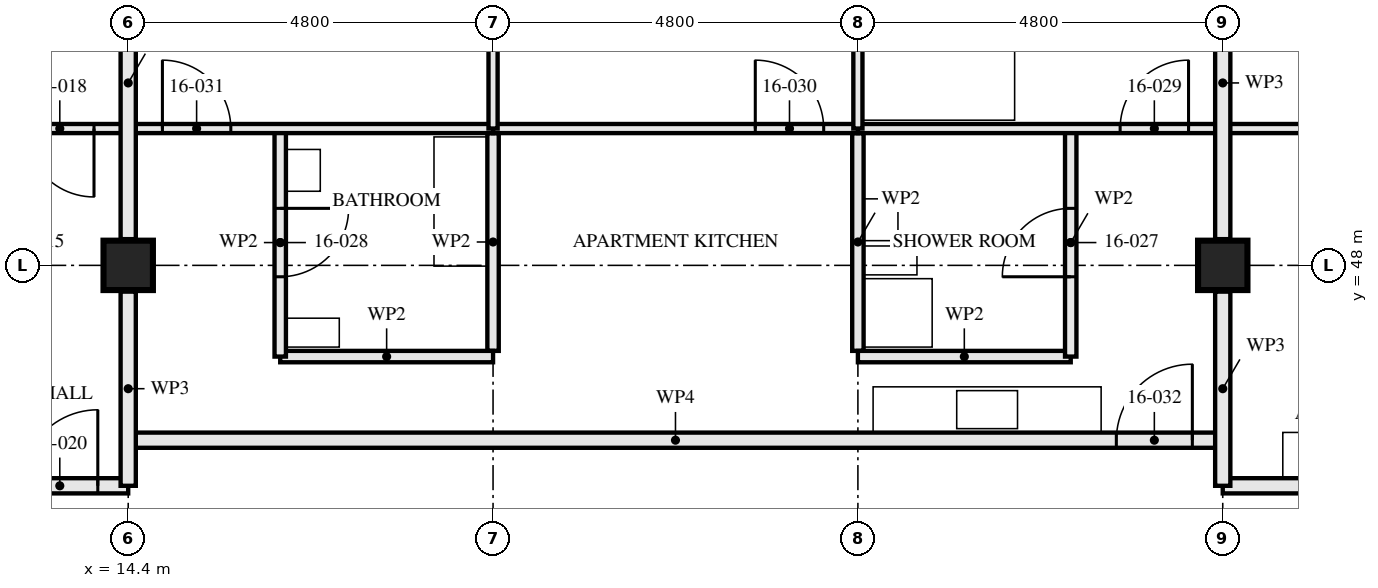
"""IFC4 building model, lengths in metres.
Left out: names, types, materials, properties, quantities, classifications, styles, units other than length and angle.
Written with IfcOpenShell. Run it as: python <this file> out.ifc"""

import sys

from ifc_helpers import new_model, si_unit, direction, frame, frame_2d, origin, origin_2d, place, context, subcontext, project, spatial, rectangle, hollow_rectangle, extrude, element, fill, save


model = new_model("IFC4")
c1 = context("Model", 3, precision=1e-05, world=origin(), true_north=direction((0.0, 1.0)))
c2 = subcontext(c1, "Body", "Model", "MODEL_VIEW")
j1 = project(units=[si_unit("LENGTHUNIT", "METRE"), si_unit("PLANEANGLEUNIT", "RADIAN")], contexts=[c1])
p1 = place(None, origin())
s1 = spatial("IfcSite", under=j1, at=p1, CompositionType="ELEMENT")
p2 = place(p1, origin())
s2 = spatial("IfcBuilding", under=s1, at=p2, CompositionType="ELEMENT")
p3 = place(p2, frame((0.0, 0.0, 62.0)))
s3 = spatial("IfcBuildingStorey", under=s2, at=p3, CompositionType="ELEMENT", Elevation=62.0)
for number, where, z_axis, x_axis in (
    (1, (14.4, 48.0, 0.0), (0.0, 0.0, 1.0), (1.0, 0.0, 0.0)),
    (2, (28.8, 48.0, 0.0), (0.0, 0.0, 1.0), (1.0, 0.0, 0.0)),
):
    element("IfcColumn", number, at=place(p3, frame(where, z_axis=z_axis, x_axis=x_axis)), inside=s3, PredefinedType="COLUMN", context=c2, shape_type="SweptSolid", body=[
        extrude(hollow_rectangle(XDim=0.65, YDim=0.65, WallThickness=0.05, at=origin_2d()), origin(), (0.0, 0.0, 1.0), 3.5),
    ])
p4 = place(p3, frame((14.4, 49.8, 0.0), z_axis=(0.0, 0.0, 1.0), x_axis=(-1.0, 0.0, 0.0)))
e3 = element("IfcWall", 3, at=p4, inside=s3, PredefinedType="PARTITIONING", context=c2, shape_type="SweptSolid", body=[
    extrude(rectangle(XDim=4.8, YDim=0.12, at=frame_2d((2.4, 0.0))), origin(), (0.0, 0.0, 1.0), 3.33),
])
p5 = place(p4, frame((0.45, 0.0, 0.0)))
e4 = element("IfcOpeningElement", 4, at=p5, cuts=e3, PredefinedType="OPENING", context=c2, shape_type="SweptSolid", body=[
    extrude(rectangle(XDim=0.9, YDim=2.1, at=frame_2d((0.45, 1.05))), frame((0.0, 0.071, 0.0), z_axis=(0.0, -1.0, 0.0), x_axis=(1.0, 0.0, 0.0)), (0.0, 0.0, 1.0), 0.141),
])
p6 = place(p3, frame((14.4, 45.1, 0.0), z_axis=(0.0, 0.0, 1.0), x_axis=(-1.0, 0.0, 0.0)))
e5 = element("IfcWall", 5, at=p6, inside=s3, PredefinedType="PARTITIONING", context=c2, shape_type="SweptSolid", body=[
    extrude(rectangle(XDim=9.6, YDim=0.2, at=frame_2d((4.8, 0.0))), origin(), (0.0, 0.0, 1.0), 3.33),
])
p7 = place(p6, frame((0.4, 0.0, 0.0)))
e6 = element("IfcOpeningElement", 6, at=p7, cuts=e5, PredefinedType="OPENING", context=c2, shape_type="SweptSolid", body=[
    extrude(rectangle(XDim=1.0, YDim=2.1, at=frame_2d((0.5, 1.05))), frame((0.0, 0.111, 0.0), z_axis=(0.0, -1.0, 0.0), x_axis=(1.0, 0.0, 0.0)), (0.0, 0.0, 1.0), 0.221),
])
p8 = place(p3, frame((26.8, 49.8, 0.0), z_axis=(0.0, 0.0, 1.0), x_axis=(0.0, -1.0, 0.0)))
e7 = element("IfcWall", 7, at=p8, inside=s3, PredefinedType="PARTITIONING", context=c2, shape_type="SweptSolid", body=[
    extrude(rectangle(XDim=3.0, YDim=0.15, at=frame_2d((1.5, 0.0))), origin(), (0.0, 0.0, 1.0), 2.55),
])
p9 = place(p8, frame((1.05, 0.0, 0.0)))
e8 = element("IfcOpeningElement", 8, at=p9, cuts=e7, PredefinedType="OPENING", context=c2, shape_type="SweptSolid", body=[
    extrude(rectangle(XDim=0.9, YDim=2.1, at=frame_2d((0.45, 1.05))), frame((0.0, 0.085, 0.0), z_axis=(0.0, -1.0, 0.0), x_axis=(1.0, 0.0, 0.0)), (0.0, 0.0, 1.0), 0.171),
])
p10 = place(p3, frame((26.8, 46.8, 0.0), z_axis=(0.0, 0.0, 1.0), x_axis=(-1.0, 0.0, 0.0)))
e9 = element("IfcWall", 9, at=p10, inside=s3, PredefinedType="PARTITIONING", context=c2, shape_type="SweptSolid", body=[
    extrude(rectangle(XDim=2.8, YDim=0.15, at=frame_2d((1.4, 0.0))), origin(), (0.0, 0.0, 1.0), 3.33),
])
p11 = place(p3, frame((16.4, 49.8, 0.0), z_axis=(0.0, 0.0, 1.0), x_axis=(0.0, -1.0, 0.0)))
e10 = element("IfcWall", 10, at=p11, inside=s3, PredefinedType="PARTITIONING", context=c2, shape_type="SweptSolid", body=[
    extrude(rectangle(XDim=3.0, YDim=0.15, at=frame_2d((1.5, 0.0))), origin(), (0.0, 0.0, 1.0), 2.55),
])
p12 = place(p11, frame((1.05, 0.0, 0.0)))
e11 = element("IfcOpeningElement", 11, at=p12, cuts=e10, PredefinedType="OPENING", context=c2, shape_type="SweptSolid", body=[
    extrude(rectangle(XDim=0.9, YDim=2.1, at=frame_2d((0.45, 1.05))), frame((0.0, 0.085, 0.0), z_axis=(0.0, -1.0, 0.0), x_axis=(1.0, 0.0, 0.0)), (0.0, 0.0, 1.0), 0.171),
])
p13 = place(p3, frame((19.2, 46.8, 0.0), z_axis=(0.0, 0.0, 1.0), x_axis=(-1.0, 0.0, 0.0)))
e12 = element("IfcWall", 12, at=p13, inside=s3, PredefinedType="PARTITIONING", context=c2, shape_type="SweptSolid", body=[
    extrude(rectangle(XDim=2.8, YDim=0.15, at=frame_2d((1.4, 0.0))), origin(), (0.0, 0.0, 1.0), 3.33),
])
p14 = place(p3, frame((28.8, 49.8, 0.0), z_axis=(0.0, 0.0, 1.0), x_axis=(-1.0, 0.0, 0.0)))
e13 = element("IfcWall", 13, at=p14, inside=s3, PredefinedType="PARTITIONING", context=c2, shape_type="SweptSolid", body=[
    extrude(rectangle(XDim=4.8, YDim=0.12, at=frame_2d((2.4, 0.0))), origin(), (0.0, 0.0, 1.0), 3.33),
])
p15 = place(p14, frame((0.45, 0.0, 0.0)))
e14 = element("IfcOpeningElement", 14, at=p15, cuts=e13, PredefinedType="OPENING", context=c2, shape_type="SweptSolid", body=[
    extrude(rectangle(XDim=0.9, YDim=2.1, at=frame_2d((0.45, 1.05))), frame((0.0, 0.071, 0.0), z_axis=(0.0, -1.0, 0.0), x_axis=(1.0, 0.0, 0.0)), (0.0, 0.0, 1.0), 0.141),
])
p16 = place(p3, frame((24.0, 49.8, 0.0), z_axis=(0.0, 0.0, 1.0), x_axis=(-1.0, 0.0, 0.0)))
e15 = element("IfcWall", 15, at=p16, inside=s3, PredefinedType="PARTITIONING", context=c2, shape_type="SweptSolid", body=[
    extrude(rectangle(XDim=4.8, YDim=0.12, at=frame_2d((2.4, 0.0))), origin(), (0.0, 0.0, 1.0), 3.33),
])
p17 = place(p16, frame((0.45, 0.0, 0.0)))
e16 = element("IfcOpeningElement", 16, at=p17, cuts=e15, PredefinedType="OPENING", context=c2, shape_type="SweptSolid", body=[
    extrude(rectangle(XDim=0.9, YDim=2.1, at=frame_2d((0.45, 1.05))), frame((0.0, 0.071, 0.0), z_axis=(0.0, -1.0, 0.0), x_axis=(1.0, 0.0, 0.0)), (0.0, 0.0, 1.0), 0.141),
])
p18 = place(p3, frame((19.2, 49.8, 0.0), z_axis=(0.0, 0.0, 1.0), x_axis=(-1.0, 0.0, 0.0)))
e17 = element("IfcWall", 17, at=p18, inside=s3, PredefinedType="PARTITIONING", context=c2, shape_type="SweptSolid", body=[
    extrude(rectangle(XDim=4.8, YDim=0.12, at=frame_2d((2.4, 0.0))), origin(), (0.0, 0.0, 1.0), 3.33),
])
p19 = place(p18, frame((3.45, 0.0, 0.0)))
e18 = element("IfcOpeningElement", 18, at=p19, cuts=e17, PredefinedType="OPENING", context=c2, shape_type="SweptSolid", body=[
    extrude(rectangle(XDim=0.9, YDim=2.1, at=frame_2d((0.45, 1.05))), frame((0.0, 0.071, 0.0), z_axis=(0.0, -1.0, 0.0), x_axis=(1.0, 0.0, 0.0)), (0.0, 0.0, 1.0), 0.141),
])
for number, where, z_axis, x_axis in (
    (19, (24.0, 57.28, 0.0), (0.0, 0.0, 1.0), (0.0, -1.0, 0.0)),
    (20, (19.2, 57.28, 0.0), (0.0, 0.0, 1.0), (0.0, -1.0, 0.0)),
):
    element("IfcWall", number, at=place(p3, frame(where, z_axis=z_axis, x_axis=x_axis)), inside=s3, PredefinedType="PARTITIONING", context=c2, shape_type="SweptSolid", body=[
        extrude(rectangle(XDim=7.48, YDim=0.12, at=frame_2d((3.74, 0.0))), origin(), (0.0, 0.0, 1.0), 2.55),
    ])
p20 = place(p3, frame((28.8, 45.7, 0.0), z_axis=(0.0, 0.0, 1.0), x_axis=(-1.0, 0.0, 0.0)))
e21 = element("IfcWall", 21, at=p20, inside=s3, PredefinedType="PARTITIONING", context=c2, shape_type="SweptSolid", body=[
    extrude(rectangle(XDim=14.4, YDim=0.2, at=frame_2d((7.2, 0.0))), origin(), (0.0, 0.0, 1.0), 3.33),
])
p21 = place(p20, frame((0.4, 0.0, 0.0)))
e22 = element("IfcOpeningElement", 22, at=p21, cuts=e21, PredefinedType="OPENING", context=c2, shape_type="SweptSolid", body=[
    extrude(rectangle(XDim=1.0, YDim=2.1, at=frame_2d((0.5, 1.05))), frame((0.0, 0.111, 0.0), z_axis=(0.0, -1.0, 0.0), x_axis=(1.0, 0.0, 0.0)), (0.0, 0.0, 1.0), 0.221),
])
p22 = place(p3, frame((33.6, 49.8, 0.0), z_axis=(0.0, 0.0, 1.0), x_axis=(-1.0, 0.0, 0.0)))
e23 = element("IfcWall", 23, at=p22, inside=s3, PredefinedType="PARTITIONING", context=c2, shape_type="SweptSolid", body=[
    extrude(rectangle(XDim=4.8, YDim=0.12, at=frame_2d((2.4, 0.0))), origin(), (0.0, 0.0, 1.0), 3.33),
])
p23 = place(p3, frame((38.4, 45.1, 0.0), z_axis=(0.0, 0.0, 1.0), x_axis=(-1.0, 0.0, 0.0)))
e24 = element("IfcWall", 24, at=p23, inside=s3, PredefinedType="PARTITIONING", context=c2, shape_type="SweptSolid", body=[
    extrude(rectangle(XDim=9.6, YDim=0.2, at=frame_2d((4.8, 0.0))), origin(), (0.0, 0.0, 1.0), 3.33),
])
p24 = place(p23, frame((0.4, 0.0, 0.0)))
e25 = element("IfcOpeningElement", 25, at=p24, cuts=e24, PredefinedType="OPENING", context=c2, shape_type="SweptSolid", body=[
    extrude(rectangle(XDim=1.0, YDim=2.1, at=frame_2d((0.5, 1.05))), frame((0.0, 0.111, 0.0), z_axis=(0.0, -1.0, 0.0), x_axis=(1.0, 0.0, 0.0)), (0.0, 0.0, 1.0), 0.221),
])
p25 = place(p3, frame((14.4, 45.1, 0.0), z_axis=(0.0, 0.0, 1.0), x_axis=(0.0, 1.0, 0.0)))
e26 = element("IfcWall", 26, at=p25, inside=s3, PredefinedType="PARTITIONING", context=c2, shape_type="SweptSolid", body=[
    extrude(rectangle(XDim=2.555, YDim=0.2, at=frame_2d((1.277, 0.0))), origin(), (0.0, 0.0, 1.0), 2.32),
])
p26 = place(p3, frame((14.4, 48.345, 0.0), z_axis=(0.0, 0.0, 1.0), x_axis=(0.0, 1.0, 0.0)))
e27 = element("IfcWall", 27, at=p26, inside=s3, PredefinedType="PARTITIONING", context=c2, shape_type="SweptSolid", body=[
    extrude(rectangle(XDim=4.11, YDim=0.2, at=frame_2d((2.055, 0.0))), origin(), (0.0, 0.0, 1.0), 2.32),
])
p27 = place(p3, frame((28.8, 45.1, 0.0), z_axis=(0.0, 0.0, 1.0), x_axis=(0.0, 1.0, 0.0)))
e28 = element("IfcWall", 28, at=p27, inside=s3, PredefinedType="PARTITIONING", context=c2, shape_type="SweptSolid", body=[
    extrude(rectangle(XDim=2.555, YDim=0.2, at=frame_2d((1.277, 0.0))), origin(), (0.0, 0.0, 1.0), 2.32),
])
p28 = place(p3, frame((28.8, 48.345, 0.0), z_axis=(0.0, 0.0, 1.0), x_axis=(0.0, 1.0, 0.0)))
e29 = element("IfcWall", 29, at=p28, inside=s3, PredefinedType="PARTITIONING", context=c2, shape_type="SweptSolid", body=[
    extrude(rectangle(XDim=4.11, YDim=0.2, at=frame_2d((2.055, 0.0))), origin(), (0.0, 0.0, 1.0), 2.32),
])
for number, where, z_axis, x_axis in (
    (30, (24.0, 46.875, 0.0), (0.0, 0.0, 1.0), (0.0, 1.0, 0.0)),
    (31, (19.2, 49.74, 0.0), (0.0, 0.0, 1.0), (0.0, -1.0, 0.0)),
):
    element("IfcWall", number, at=place(p3, frame(where, z_axis=z_axis, x_axis=x_axis)), inside=s3, PredefinedType="PARTITIONING", context=c2, shape_type="SweptSolid", body=[
        extrude(rectangle(XDim=2.865, YDim=0.15, at=frame_2d((1.433, 0.0))), origin(), (0.0, 0.0, 1.0), 2.55),
    ])
p29 = place(p5, origin())
e32 = element("IfcDoor", 32, at=p29, inside=s3, OperationType="SINGLE_SWING_RIGHT", PredefinedType="DOOR", context=c2, shape_type="SweptSolid", body=[
    extrude(rectangle(XDim=0.9, YDim=2.1, at=frame_2d((0.45, 1.05))), frame((0.0, 0.022, 0.0), z_axis=(0.0, -1.0, 0.0), x_axis=(1.0, 0.0, 0.0)), (0.0, 0.0, 1.0), 0.044),
])
fill(e4, e32)
p30 = place(p7, frame((1.0, 0.0, 0.0), z_axis=(0.0, 0.0, 1.0), x_axis=(-1.0, 0.0, 0.0)))
e33 = element("IfcDoor", 33, at=p30, inside=s3, OperationType="SINGLE_SWING_LEFT", PredefinedType="DOOR", context=c2, shape_type="SweptSolid", body=[
    extrude(rectangle(XDim=1.0, YDim=2.1, at=frame_2d((0.5, 1.05))), frame((0.0, 0.027, 0.0), z_axis=(0.0, -1.0, 0.0), x_axis=(1.0, 0.0, 0.0)), (0.0, 0.0, 1.0), 0.054),
])
fill(e6, e33)
p31 = place(p9, frame((0.9, 0.0, 0.0), z_axis=(0.0, 0.0, 1.0), x_axis=(-1.0, 0.0, 0.0)))
e34 = element("IfcDoor", 34, at=p31, inside=s3, OperationType="SINGLE_SWING_RIGHT", PredefinedType="DOOR", context=c2, shape_type="SweptSolid", body=[
    extrude(rectangle(XDim=0.9, YDim=2.1, at=frame_2d((0.45, 1.05))), frame((0.0, 0.022, 0.0), z_axis=(0.0, -1.0, 0.0), x_axis=(1.0, 0.0, 0.0)), (0.0, 0.0, 1.0), 0.044),
])
fill(e8, e34)
p32 = place(p12, origin())
e35 = element("IfcDoor", 35, at=p32, inside=s3, OperationType="SINGLE_SWING_RIGHT", PredefinedType="DOOR", context=c2, shape_type="SweptSolid", body=[
    extrude(rectangle(XDim=0.9, YDim=2.1, at=frame_2d((0.45, 1.05))), frame((0.0, 0.022, 0.0), z_axis=(0.0, -1.0, 0.0), x_axis=(1.0, 0.0, 0.0)), (0.0, 0.0, 1.0), 0.044),
])
fill(e11, e35)
p33 = place(p15, frame((0.9, 0.0, 0.0), z_axis=(0.0, 0.0, 1.0), x_axis=(-1.0, 0.0, 0.0)))
e36 = element("IfcDoor", 36, at=p33, inside=s3, OperationType="SINGLE_SWING_LEFT", PredefinedType="DOOR", context=c2, shape_type="SweptSolid", body=[
    extrude(rectangle(XDim=0.9, YDim=2.1, at=frame_2d((0.45, 1.05))), frame((0.0, 0.022, 0.0), z_axis=(0.0, -1.0, 0.0), x_axis=(1.0, 0.0, 0.0)), (0.0, 0.0, 1.0), 0.044),
])
fill(e14, e36)
p34 = place(p17, frame((0.9, 0.0, 0.0), z_axis=(0.0, 0.0, 1.0), x_axis=(-1.0, 0.0, 0.0)))
e37 = element("IfcDoor", 37, at=p34, inside=s3, OperationType="SINGLE_SWING_RIGHT", PredefinedType="DOOR", context=c2, shape_type="SweptSolid", body=[
    extrude(rectangle(XDim=0.9, YDim=2.1, at=frame_2d((0.45, 1.05))), frame((0.0, 0.022, 0.0), z_axis=(0.0, -1.0, 0.0), x_axis=(1.0, 0.0, 0.0)), (0.0, 0.0, 1.0), 0.044),
])
fill(e16, e37)
p35 = place(p19, frame((0.9, 0.0, 0.0), z_axis=(0.0, 0.0, 1.0), x_axis=(-1.0, 0.0, 0.0)))
e38 = element("IfcDoor", 38, at=p35, inside=s3, OperationType="SINGLE_SWING_RIGHT", PredefinedType="DOOR", context=c2, shape_type="SweptSolid", body=[
    extrude(rectangle(XDim=0.9, YDim=2.1, at=frame_2d((0.45, 1.05))), frame((0.0, 0.022, 0.0), z_axis=(0.0, -1.0, 0.0), x_axis=(1.0, 0.0, 0.0)), (0.0, 0.0, 1.0), 0.044),
])
fill(e18, e38)
p36 = place(p21, frame((1.0, 0.0, 0.0), z_axis=(0.0, 0.0, 1.0), x_axis=(-1.0, 0.0, 0.0)))
e39 = element("IfcDoor", 39, at=p36, inside=s3, OperationType="SINGLE_SWING_LEFT", PredefinedType="DOOR", context=c2, shape_type="SweptSolid", body=[
    extrude(rectangle(XDim=1.0, YDim=2.1, at=frame_2d((0.5, 1.05))), frame((0.0, 0.027, 0.0), z_axis=(0.0, -1.0, 0.0), x_axis=(1.0, 0.0, 0.0)), (0.0, 0.0, 1.0), 0.054),
])
fill(e22, e39)
save(model, sys.argv[1])
